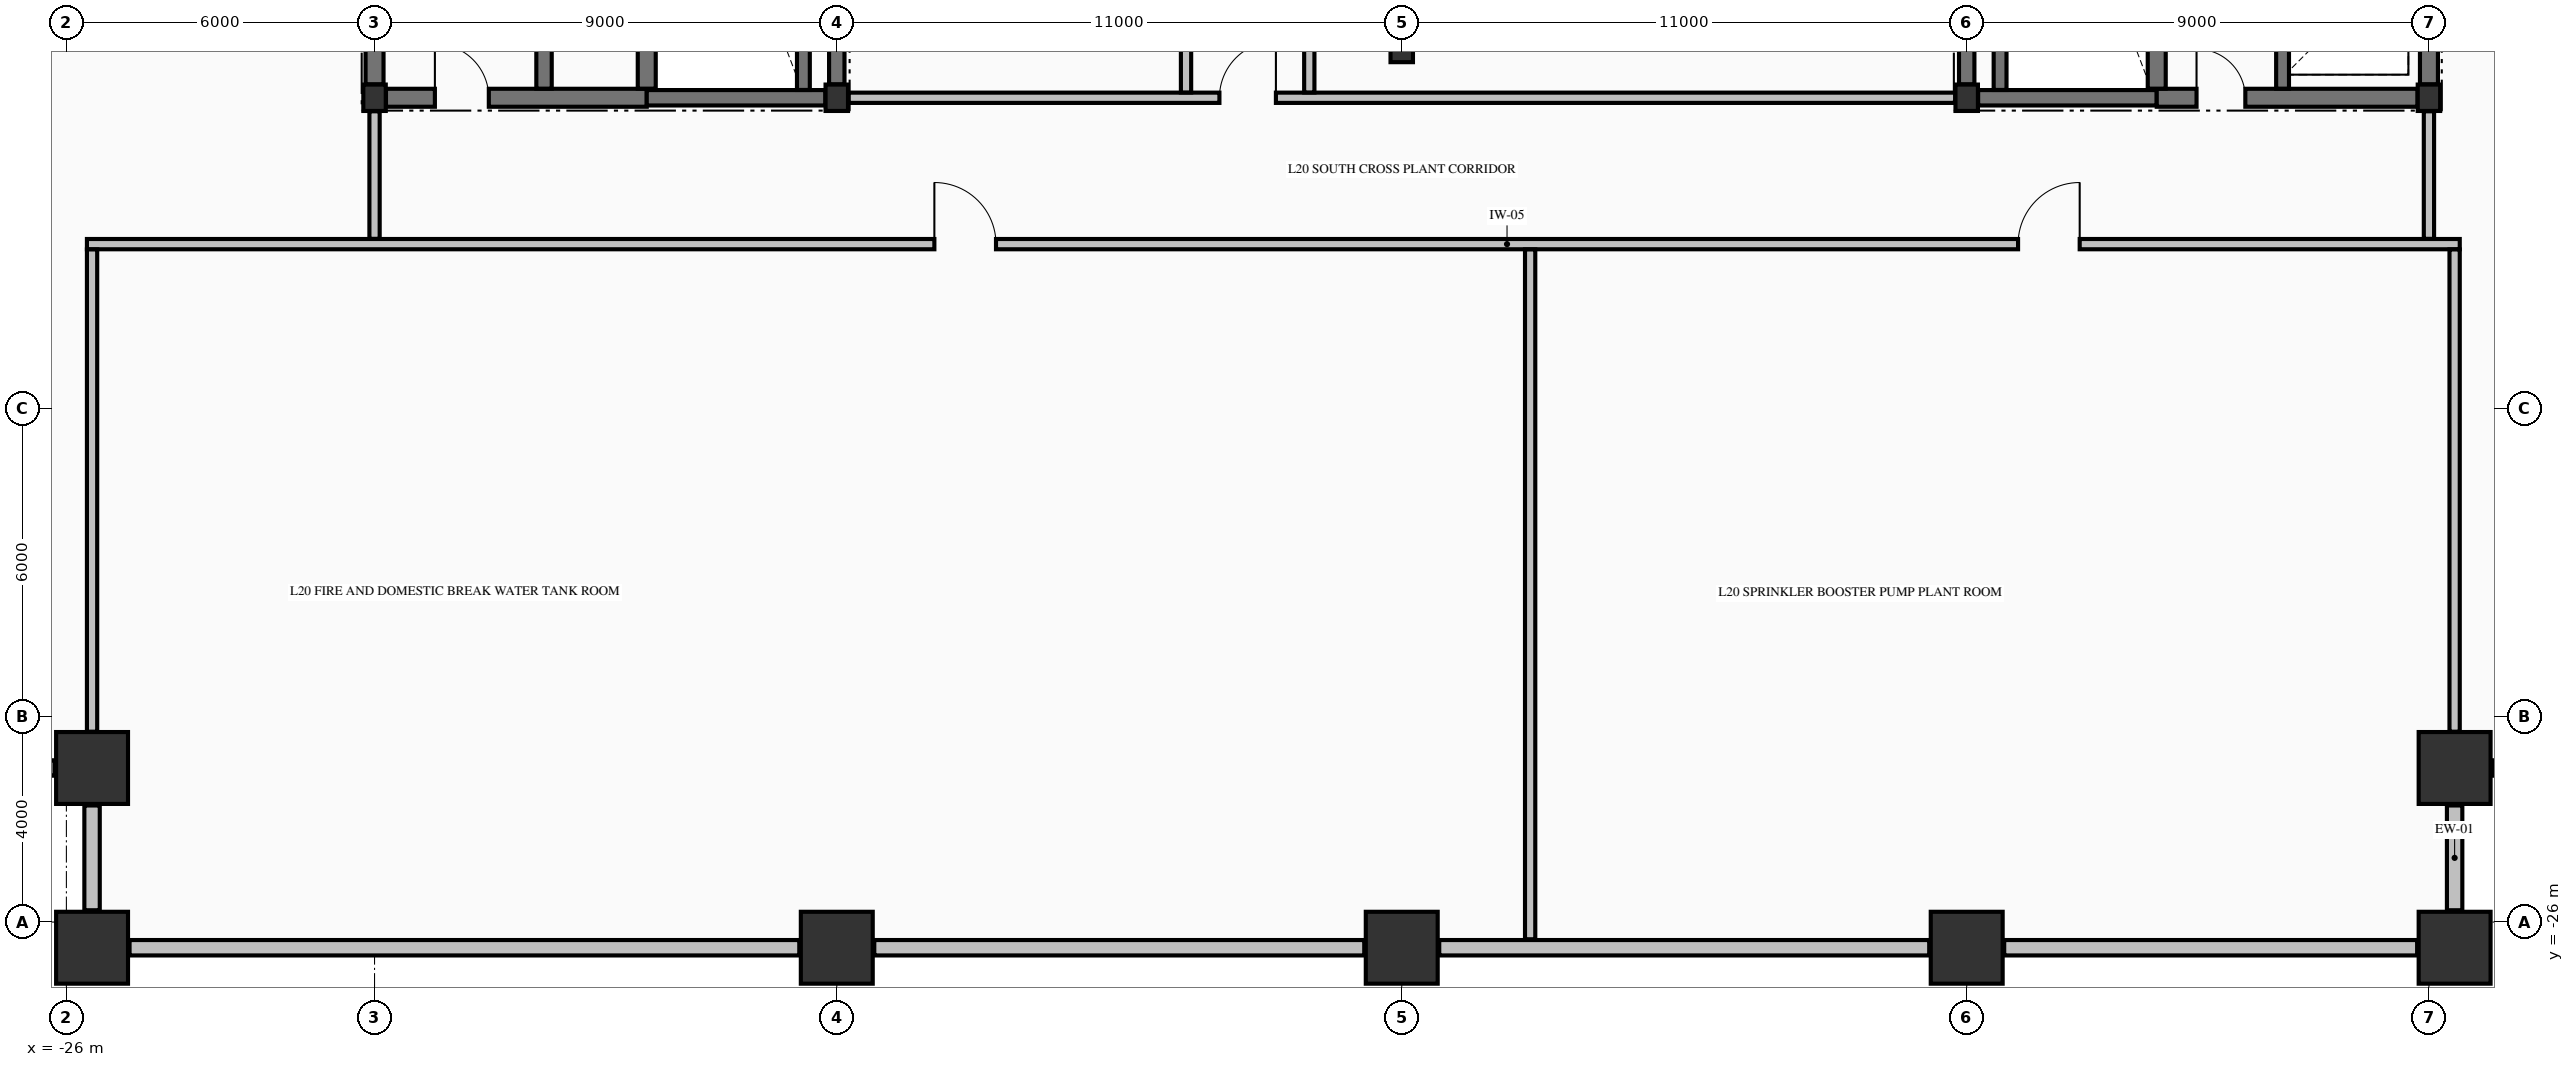
"""IFC4 building model, lengths in metres.
Left out: names, types, materials, properties, quantities, classifications, styles, units other than length and angle.
Written with IfcOpenShell. Run it as: python <this file> out.ifc"""

import sys

from ifc_helpers import new_model, si_unit, direction, frame, frame_2d, origin, origin_2d, place, context, subcontext, project, spatial, rectangle, i_section, extrude, element, fill, save


model = new_model("IFC4")
c1 = context("Model", 3, precision=1e-05, world=origin(), true_north=direction((0.0, 1.0)))
c2 = subcontext(c1, "Body", "Model", "MODEL_VIEW")
j1 = project(units=[si_unit("LENGTHUNIT", "METRE"), si_unit("PLANEANGLEUNIT", "RADIAN")], contexts=[c1])
p1 = place(None, origin())
s1 = spatial("IfcSite", under=j1, at=p1, CompositionType="ELEMENT")
p2 = place(p1, origin())
s2 = spatial("IfcBuilding", under=s1, at=p2, CompositionType="ELEMENT")
p3 = place(p2, frame((0.0, 0.0, 82.18)))
s3 = spatial("IfcBuildingStorey", under=s2, at=p3, CompositionType="ELEMENT", Elevation=82.18)
for number, where, z_axis, x_axis in (
    (1, (-25.5, -26.5, -0.425), (0.0, 0.0, 1.0), (1.0, 0.0, 0.0)),
    (2, (-11.0, -26.5, -0.425), (0.0, 0.0, 1.0), (1.0, 0.0, 0.0)),
    (3, (0.0, -26.5, -0.425), (0.0, 0.0, 1.0), (1.0, 0.0, 0.0)),
    (4, (11.0, -26.5, -0.425), (0.0, 0.0, 1.0), (1.0, 0.0, 0.0)),
    (5, (20.5, -26.5, -0.425), (0.0, 0.0, 1.0), (1.0, 0.0, 0.0)),
    (6, (-25.5, -23.0, -0.425), (0.0, 0.0, 1.0), (1.0, 0.0, 0.0)),
    (7, (20.5, -23.0, -0.425), (0.0, 0.0, 1.0), (1.0, 0.0, 0.0)),
):
    element("IfcColumn", number, at=place(p3, frame(where, z_axis=z_axis, x_axis=x_axis)), inside=s3, PredefinedType="COLUMN", context=c2, shape_type="SweptSolid", body=[
        extrude(rectangle(XDim=1.4, YDim=1.4, at=origin_2d()), origin(), (0.0, 0.0, 1.0), 4.76),
    ])
for number, where, z_axis, x_axis in (
    (8, (-20.0, -9.95, -0.425), (0.0, 0.0, 1.0), (1.0, 0.0, 0.0)),
    (9, (-11.0, -9.95, -0.425), (0.0, 0.0, 1.0), (1.0, 0.0, 0.0)),
    (10, (11.0, -9.95, -0.425), (0.0, 0.0, 1.0), (1.0, 0.0, 0.0)),
    (11, (20.0, -9.95, -0.425), (0.0, 0.0, 1.0), (1.0, 0.0, 0.0)),
    (12, (0.0, -9.0, -0.425), (0.0, 0.0, 1.0), (1.0, 0.0, 0.0)),
):
    element("IfcColumn", number, at=place(p3, frame(where, z_axis=z_axis, x_axis=x_axis)), inside=s3, PredefinedType="COLUMN", context=c2, shape_type="SweptSolid", body=[
        extrude(i_section(OverallWidth=0.437, OverallDepth=0.514, WebThickness=0.061, FlangeThickness=0.097, FilletRadius=0.015, at=origin_2d()), origin(), (0.0, 0.0, 1.0), 4.76),
    ])
p4 = place(p3, frame((20.5, -25.77, 0.0), z_axis=(0.0, 0.0, 1.0), x_axis=(0.0, 1.0, 0.0)))
e13 = element("IfcWall", 13, at=p4, inside=s3, PredefinedType="STANDARD", context=c2, shape_type="SweptSolid", body=[
    extrude(rectangle(XDim=2.04, YDim=0.3, at=frame_2d((1.02, 0.0))), origin(), (0.0, 0.0, 1.0), 2.527),
])
for number, where, z_axis, x_axis in (
    (14, (21.23, -23.0, 0.0), (0.0, 0.0, 1.0), (1.0, 0.0, 0.0)),
    (15, (-28.27, -23.0, 0.0), (0.0, 0.0, 1.0), (1.0, 0.0, 0.0)),
):
    element("IfcWall", number, at=place(p3, frame(where, z_axis=z_axis, x_axis=x_axis)), inside=s3, PredefinedType="STANDARD", context=c2, shape_type="SweptSolid", body=[
        extrude(rectangle(XDim=2.04, YDim=0.3, at=frame_2d((1.02, 0.0))), origin(), (0.0, 0.0, 1.0), 1.927),
    ])
p5 = place(p3, frame((-25.5, -23.73, 0.0), z_axis=(0.0, 0.0, 1.0), x_axis=(0.0, -1.0, 0.0)))
e16 = element("IfcWall", 16, at=p5, inside=s3, PredefinedType="STANDARD", context=c2, shape_type="SweptSolid", body=[
    extrude(rectangle(XDim=2.04, YDim=0.3, at=frame_2d((1.02, 0.0))), origin(), (0.0, 0.0, 1.0), 2.527),
])
p6 = place(p3, frame((-24.77, -26.5, 0.0), z_axis=(0.0, 0.0, 1.0), x_axis=(1.0, 0.0, 0.0)))
e17 = element("IfcWall", 17, at=p6, inside=s3, PredefinedType="STANDARD", context=c2, shape_type="SweptSolid", body=[
    extrude(rectangle(XDim=13.04, YDim=0.3, at=frame_2d((6.52, 0.0))), origin(), (0.0, 0.0, 1.0), 1.927),
])
for number, where, z_axis, x_axis in (
    (18, (-10.27, -26.5, 0.0), (0.0, 0.0, 1.0), (1.0, 0.0, 0.0)),
    (19, (0.73, -26.5, 0.0), (0.0, 0.0, 1.0), (1.0, 0.0, 0.0)),
):
    element("IfcWall", number, at=place(p3, frame(where, z_axis=z_axis, x_axis=x_axis)), inside=s3, PredefinedType="STANDARD", context=c2, shape_type="SweptSolid", body=[
        extrude(rectangle(XDim=9.54, YDim=0.3, at=frame_2d((4.77, 0.0))), origin(), (0.0, 0.0, 1.0), 1.927),
    ])
p7 = place(p3, frame((11.73, -26.5, 0.0), z_axis=(0.0, 0.0, 1.0), x_axis=(1.0, 0.0, 0.0)))
e20 = element("IfcWall", 20, at=p7, inside=s3, PredefinedType="STANDARD", context=c2, shape_type="SweptSolid", body=[
    extrude(rectangle(XDim=8.04, YDim=0.3, at=frame_2d((4.02, 0.0))), origin(), (0.0, 0.0, 1.0), 1.927),
])
p8 = place(p3, frame((-19.778, -9.95, 0.0), z_axis=(0.0, 0.0, 1.0), x_axis=(1.0, 0.0, 0.0)))
e21 = element("IfcWall", 21, at=p8, inside=s3, PredefinedType="SHEAR", context=c2, shape_type="SweptSolid", body=[
    extrude(rectangle(XDim=5.078, YDim=0.35, at=frame_2d((2.539, 0.0))), origin(), (0.0, 0.0, 1.0), 4.335),
])
p9 = place(p8, frame((0.952, 0.0, 0.0)))
e22 = element("IfcOpeningElement", 22, at=p9, cuts=e21, PredefinedType="OPENING", context=c2, shape_type="SweptSolid", body=[
    extrude(rectangle(XDim=1.05, YDim=2.15, at=frame_2d((0.525, 1.075))), frame((0.0, 0.185, 0.0), z_axis=(0.0, -1.0, 0.0), x_axis=(1.0, 0.0, 0.0)), (0.0, 0.0, 1.0), 0.37),
])
for number, where, z_axis, x_axis in (
    (23, (-14.7, -9.95, 0.0), (0.0, 0.0, 1.0), (1.0, 0.0, 0.0)),
    (24, (11.222, -9.95, 0.0), (0.0, 0.0, 1.0), (1.0, 0.0, 0.0)),
):
    element("IfcWall", number, at=place(p3, frame(where, z_axis=z_axis, x_axis=x_axis)), inside=s3, PredefinedType="SHEAR", context=c2, shape_type="SweptSolid", body=[
        extrude(rectangle(XDim=3.478, YDim=0.3, at=frame_2d((1.739, 0.0))), origin(), (0.0, 0.0, 1.0), 4.335),
    ])
p10 = place(p3, frame((14.7, -9.95, 0.0), z_axis=(0.0, 0.0, 1.0), x_axis=(1.0, 0.0, 0.0)))
e25 = element("IfcWall", 25, at=p10, inside=s3, PredefinedType="SHEAR", context=c2, shape_type="SweptSolid", body=[
    extrude(rectangle(XDim=5.078, YDim=0.35, at=frame_2d((2.539, 0.0))), origin(), (0.0, 0.0, 1.0), 4.335),
])
p11 = place(p10, frame((0.775, 0.0, 0.0)))
e26 = element("IfcOpeningElement", 26, at=p11, cuts=e25, PredefinedType="OPENING", context=c2, shape_type="SweptSolid", body=[
    extrude(rectangle(XDim=0.95, YDim=2.15, at=frame_2d((0.475, 1.075))), frame((0.0, 0.185, 0.0), z_axis=(0.0, -1.0, 0.0), x_axis=(1.0, 0.0, 0.0)), (0.0, 0.0, 1.0), 0.37),
])
p12 = place(p3, frame((-25.6, -12.8, 0.0), z_axis=(0.0, 0.0, 1.0), x_axis=(1.0, 0.0, 0.0)))
e27 = element("IfcWall", 27, at=p12, inside=s3, PredefinedType="PARTITIONING", context=c2, shape_type="SweptSolid", body=[
    extrude(rectangle(XDim=46.2, YDim=0.2, at=frame_2d((23.1, 0.0))), origin(), (0.0, 0.0, 1.0), 4.335),
])
p13 = place(p12, frame((16.5, 0.0, 0.0)))
e28 = element("IfcOpeningElement", 28, at=p13, cuts=e27, PredefinedType="OPENING", context=c2, shape_type="SweptSolid", body=[
    extrude(rectangle(XDim=1.2, YDim=2.15, at=frame_2d((0.6, 1.075))), frame((0.0, 0.11, 0.0), z_axis=(0.0, -1.0, 0.0), x_axis=(1.0, 0.0, 0.0)), (0.0, 0.0, 1.0), 0.22),
])
p14 = place(p12, frame((37.6, 0.0, 0.0)))
e29 = element("IfcOpeningElement", 29, at=p14, cuts=e27, PredefinedType="OPENING", context=c2, shape_type="SweptSolid", body=[
    extrude(rectangle(XDim=1.2, YDim=2.15, at=frame_2d((0.6, 1.075))), frame((0.0, 0.11, 0.0), z_axis=(0.0, -1.0, 0.0), x_axis=(1.0, 0.0, 0.0)), (0.0, 0.0, 1.0), 0.22),
])
p15 = place(p3, frame((-10.775, -9.95, 0.0), z_axis=(0.0, 0.0, 1.0), x_axis=(1.0, 0.0, 0.0)))
e30 = element("IfcWall", 30, at=p15, inside=s3, PredefinedType="PARTITIONING", context=c2, shape_type="SweptSolid", body=[
    extrude(rectangle(XDim=21.551, YDim=0.2, at=frame_2d((10.775, 0.0))), origin(), (0.0, 0.0, 1.0), 4.335),
])
p16 = place(p15, frame((7.226, 0.0, 0.0)))
e31 = element("IfcOpeningElement", 31, at=p16, cuts=e30, PredefinedType="OPENING", context=c2, shape_type="SweptSolid", body=[
    extrude(rectangle(XDim=1.1, YDim=2.15, at=frame_2d((0.55, 1.075))), frame((0.0, 0.11, 0.0), z_axis=(0.0, -1.0, 0.0), x_axis=(1.0, 0.0, 0.0)), (0.0, 0.0, 1.0), 0.22),
])
p17 = place(p3, frame((-20.0, -9.689, 0.0), z_axis=(0.0, 0.0, 1.0), x_axis=(0.0, 1.0, 0.0)))
e32 = element("IfcWall", 32, at=p17, inside=s3, PredefinedType="SHEAR", context=c2, shape_type="SweptSolid", body=[
    extrude(rectangle(XDim=9.428, YDim=0.35, at=frame_2d((4.714, 0.0))), origin(), (0.0, 0.0, 1.0), 4.335),
])
p18 = place(p3, frame((-16.7, -9.773, 0.0), z_axis=(0.0, 0.0, 1.0), x_axis=(0.0, 1.0, 0.0)))
e33 = element("IfcWall", 33, at=p18, inside=s3, PredefinedType="SHEAR", context=c2, shape_type="SweptSolid", body=[
    extrude(rectangle(XDim=9.371, YDim=0.3, at=frame_2d((4.686, 0.0))), origin(), (0.0, 0.0, 1.0), 4.335),
])
p19 = place(p3, frame((-14.7, -9.773, 0.0), z_axis=(0.0, 0.0, 1.0), x_axis=(0.0, 1.0, 0.0)))
e34 = element("IfcWall", 34, at=p19, inside=s3, PredefinedType="SHEAR", context=c2, shape_type="SweptSolid", body=[
    extrude(rectangle(XDim=9.371, YDim=0.35, at=frame_2d((4.686, 0.0))), origin(), (0.0, 0.0, 1.0), 4.335),
])
p20 = place(p3, frame((-11.65, -9.798, 0.0), z_axis=(0.0, 0.0, 1.0), x_axis=(0.0, 1.0, 0.0)))
e35 = element("IfcWall", 35, at=p20, inside=s3, PredefinedType="SOLIDWALL", context=c2, shape_type="SweptSolid", body=[
    extrude(rectangle(XDim=9.396, YDim=0.25, at=frame_2d((4.698, 0.0))), origin(), (0.0, 0.0, 1.0), 4.335),
])
for number, where, z_axis, x_axis in (
    (36, (-11.0, -9.689, 0.0), (0.0, 0.0, 1.0), (0.0, 1.0, 0.0)),
    (37, (11.0, -9.689, 0.0), (0.0, 0.0, 1.0), (0.0, 1.0, 0.0)),
):
    element("IfcWall", number, at=place(p3, frame(where, z_axis=z_axis, x_axis=x_axis)), inside=s3, PredefinedType="SHEAR", context=c2, shape_type="SweptSolid", body=[
        extrude(rectangle(XDim=9.428, YDim=0.3, at=frame_2d((4.714, 0.0))), origin(), (0.0, 0.0, 1.0), 4.335),
    ])
p21 = place(p3, frame((11.65, -9.798, 0.0), z_axis=(0.0, 0.0, 1.0), x_axis=(0.0, 1.0, 0.0)))
e38 = element("IfcWall", 38, at=p21, inside=s3, PredefinedType="SOLIDWALL", context=c2, shape_type="SweptSolid", body=[
    extrude(rectangle(XDim=9.396, YDim=0.25, at=frame_2d((4.698, 0.0))), origin(), (0.0, 0.0, 1.0), 4.335),
])
p22 = place(p3, frame((14.7, -9.773, 0.0), z_axis=(0.0, 0.0, 1.0), x_axis=(0.0, 1.0, 0.0)))
e39 = element("IfcWall", 39, at=p22, inside=s3, PredefinedType="SHEAR", context=c2, shape_type="SweptSolid", body=[
    extrude(rectangle(XDim=9.371, YDim=0.35, at=frame_2d((4.686, 0.0))), origin(), (0.0, 0.0, 1.0), 4.335),
])
p23 = place(p3, frame((17.15, -9.773, 0.0), z_axis=(0.0, 0.0, 1.0), x_axis=(0.0, 1.0, 0.0)))
e40 = element("IfcWall", 40, at=p23, inside=s3, PredefinedType="SOLIDWALL", context=c2, shape_type="SweptSolid", body=[
    extrude(rectangle(XDim=2.596, YDim=0.25, at=frame_2d((1.298, 0.0))), origin(), (0.0, 0.0, 1.0), 4.335),
])
p24 = place(p3, frame((20.0, -9.689, 0.0), z_axis=(0.0, 0.0, 1.0), x_axis=(0.0, 1.0, 0.0)))
e41 = element("IfcWall", 41, at=p24, inside=s3, PredefinedType="SHEAR", context=c2, shape_type="SweptSolid", body=[
    extrude(rectangle(XDim=2.512, YDim=0.35, at=frame_2d((1.256, 0.0))), origin(), (0.0, 0.0, 1.0), 4.335),
])
p25 = place(p3, frame((-25.5, -22.294, 0.0), z_axis=(0.0, 0.0, 1.0), x_axis=(0.0, 1.0, 0.0)))
e42 = element("IfcWall", 42, at=p25, inside=s3, PredefinedType="PARTITIONING", context=c2, shape_type="SweptSolid", body=[
    extrude(rectangle(XDim=9.391, YDim=0.2, at=frame_2d((4.695, 0.0))), origin(), (0.0, 0.0, 1.0), 4.335),
])
p26 = place(p3, frame((-20.0, -12.697, 0.0), z_axis=(0.0, 0.0, 1.0), x_axis=(0.0, 1.0, 0.0)))
e43 = element("IfcWall", 43, at=p26, inside=s3, PredefinedType="PARTITIONING", context=c2, shape_type="SweptSolid", body=[
    extrude(rectangle(XDim=2.484, YDim=0.2, at=frame_2d((1.242, 0.0))), origin(), (0.0, 0.0, 1.0), 1.927),
])
for number, where, z_axis, x_axis in (
    (44, (-4.2, -9.847, 0.0), (0.0, 0.0, 1.0), (0.0, 1.0, 0.0)),
    (45, (-1.8, -9.847, 0.0), (0.0, 0.0, 1.0), (0.0, 1.0, 0.0)),
):
    element("IfcWall", number, at=place(p3, frame(where, z_axis=z_axis, x_axis=x_axis)), inside=s3, PredefinedType="PARTITIONING", context=c2, shape_type="SweptSolid", body=[
        extrude(rectangle(XDim=10.344, YDim=0.2, at=frame_2d((5.172, 0.0))), origin(), (0.0, 0.0, 1.0), 4.335),
    ])
p27 = place(p3, frame((2.5, -26.335, 0.0), z_axis=(0.0, 0.0, 1.0), x_axis=(0.0, 1.0, 0.0)))
e46 = element("IfcWall", 46, at=p27, inside=s3, PredefinedType="PARTITIONING", context=c2, shape_type="SweptSolid", body=[
    extrude(rectangle(XDim=13.432, YDim=0.2, at=frame_2d((6.716, 0.0))), origin(), (0.0, 0.0, 1.0), 4.335),
])
p28 = place(p3, frame((20.0, -12.697, 0.0), z_axis=(0.0, 0.0, 1.0), x_axis=(0.0, 1.0, 0.0)))
e47 = element("IfcWall", 47, at=p28, inside=s3, PredefinedType="PARTITIONING", context=c2, shape_type="SweptSolid", body=[
    extrude(rectangle(XDim=2.484, YDim=0.2, at=frame_2d((1.242, 0.0))), origin(), (0.0, 0.0, 1.0), 4.335),
])
p29 = place(p3, frame((20.5, -22.294, 0.0), z_axis=(0.0, 0.0, 1.0), x_axis=(0.0, 1.0, 0.0)))
e48 = element("IfcWall", 48, at=p29, inside=s3, PredefinedType="PARTITIONING", context=c2, shape_type="SweptSolid", body=[
    extrude(rectangle(XDim=9.391, YDim=0.2, at=frame_2d((4.695, 0.0))), origin(), (0.0, 0.0, 1.0), 4.335),
])
p30 = place(p9, origin())
e49 = element("IfcDoor", 49, at=p30, inside=s3, OperationType="SINGLE_SWING_LEFT", PredefinedType="DOOR", context=c2, shape_type="SweptSolid", body=[
    extrude(rectangle(XDim=1.05, YDim=2.15, at=frame_2d((0.525, 1.075))), frame((0.0, 0.025, 0.0), z_axis=(0.0, -1.0, 0.0), x_axis=(1.0, 0.0, 0.0)), (0.0, 0.0, 1.0), 0.05),
])
fill(e22, e49)
p31 = place(p11, origin())
e50 = element("IfcDoor", 50, at=p31, inside=s3, OperationType="SINGLE_SWING_LEFT", PredefinedType="DOOR", context=c2, shape_type="SweptSolid", body=[
    extrude(rectangle(XDim=0.95, YDim=2.15, at=frame_2d((0.475, 1.075))), frame((0.0, 0.025, 0.0), z_axis=(0.0, -1.0, 0.0), x_axis=(1.0, 0.0, 0.0)), (0.0, 0.0, 1.0), 0.05),
])
fill(e26, e50)
p32 = place(p16, origin())
e51 = element("IfcDoor", 51, at=p32, inside=s3, OperationType="SINGLE_SWING_RIGHT", PredefinedType="DOOR", context=c2, shape_type="SweptSolid", body=[
    extrude(rectangle(XDim=1.1, YDim=2.15, at=frame_2d((0.55, 1.075))), frame((0.0, 0.025, 0.0), z_axis=(0.0, -1.0, 0.0), x_axis=(1.0, 0.0, 0.0)), (0.0, 0.0, 1.0), 0.05),
])
fill(e31, e51)
p33 = place(p13, origin())
e52 = element("IfcDoor", 52, at=p33, inside=s3, OperationType="SINGLE_SWING_LEFT", PredefinedType="DOOR", context=c2, shape_type="SweptSolid", body=[
    extrude(rectangle(XDim=1.2, YDim=2.15, at=frame_2d((0.6, 1.075))), frame((0.0, 0.025, 0.0), z_axis=(0.0, -1.0, 0.0), x_axis=(1.0, 0.0, 0.0)), (0.0, 0.0, 1.0), 0.05),
])
fill(e28, e52)
p34 = place(p14, origin())
e53 = element("IfcDoor", 53, at=p34, inside=s3, OperationType="SINGLE_SWING_RIGHT", PredefinedType="DOOR", context=c2, shape_type="SweptSolid", body=[
    extrude(rectangle(XDim=1.2, YDim=2.15, at=frame_2d((0.6, 1.075))), frame((0.0, 0.025, 0.0), z_axis=(0.0, -1.0, 0.0), x_axis=(1.0, 0.0, 0.0)), (0.0, 0.0, 1.0), 0.05),
])
fill(e29, e53)
save(model, sys.argv[1])
